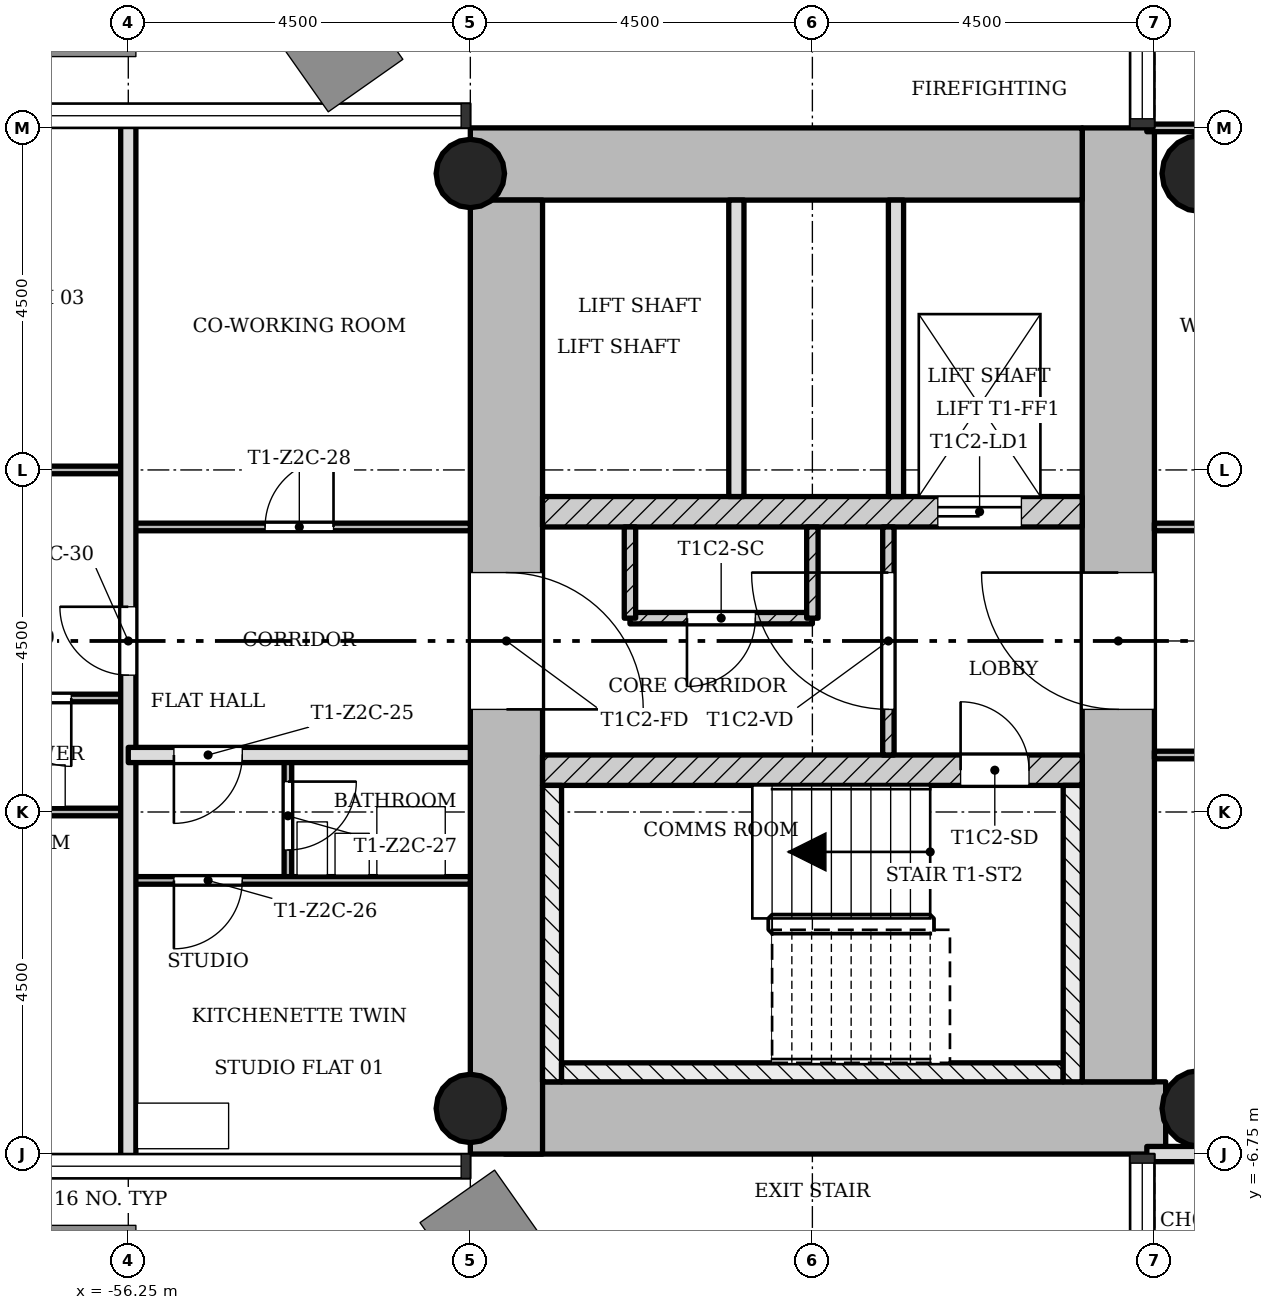
"""IFC4 building model, lengths in metres.
Left out: names, types, materials, properties, quantities, classifications, styles, units other than length and angle.
Written with IfcOpenShell. Run it as: python <this file> out.ifc"""

import sys

from ifc_helpers import new_model, si_unit, direction, frame, frame_2d, origin, origin_2d, place, context, subcontext, project, spatial, rectangle, hollow_circle, extrude, element, fill, save


model = new_model("IFC4")
c1 = context("Model", 3, precision=1e-05, world=origin(), true_north=direction((0.0, 1.0)))
c2 = subcontext(c1, "Body", "Model", "MODEL_VIEW")
j1 = project(units=[si_unit("LENGTHUNIT", "METRE"), si_unit("PLANEANGLEUNIT", "RADIAN")], contexts=[c1])
p1 = place(None, origin())
s1 = spatial("IfcSite", under=j1, at=p1, CompositionType="ELEMENT")
p2 = place(p1, origin())
s2 = spatial("IfcBuilding", under=s1, at=p2, CompositionType="ELEMENT")
p3 = place(p2, frame((0.0, 0.0, 86.8)))
s3 = spatial("IfcBuildingStorey", under=s2, at=p3, CompositionType="ELEMENT", Elevation=86.8)
p4 = place(p3, frame((-51.298, -6.275, 0.0), z_axis=(0.0, 0.0, 1.0), x_axis=(1.0, 0.0, 0.0)))
e1 = element("IfcWall", 1, at=p4, inside=s3, PredefinedType="SHEAR", context=c2, shape_type="SweptSolid", body=[
    extrude(rectangle(XDim=8.696, YDim=0.95, at=frame_2d((4.348, 0.0))), origin(), (0.0, 0.0, 1.0), 3.4),
])
p5 = place(p3, frame((-43.225, -5.8, 0.0), z_axis=(0.0, 0.0, 1.0), x_axis=(0.0, 1.0, 0.0)))
e2 = element("IfcWall", 2, at=p5, inside=s3, PredefinedType="SHEAR", context=c2, shape_type="SweptSolid", body=[
    extrude(rectangle(XDim=12.55, YDim=0.95, at=frame_2d((6.275, 0.0))), origin(), (0.0, 0.0, 1.0), 3.4),
])
p6 = place(p5, frame((4.9, 0.0, 0.0)))
e3 = element("IfcOpeningElement", 3, at=p6, cuts=e2, PredefinedType="OPENING", context=c2, shape_type="SweptSolid", body=[
    extrude(rectangle(XDim=1.8, YDim=2.1, at=frame_2d((0.9, 1.05))), frame((0.0, 0.485, 0.0), z_axis=(0.0, -1.0, 0.0), x_axis=(1.0, 0.0, 0.0)), (0.0, 0.0, 1.0), 0.97),
])
p7 = place(p3, frame((-43.7, 6.275, 0.0), z_axis=(0.0, 0.0, 1.0), x_axis=(-1.0, 0.0, 0.0)))
e4 = element("IfcWall", 4, at=p7, inside=s3, PredefinedType="SHEAR", context=c2, shape_type="SweptSolid", body=[
    extrude(rectangle(XDim=8.05, YDim=0.95, at=frame_2d((4.025, 0.0))), origin(), (0.0, 0.0, 1.0), 3.4),
])
p8 = place(p3, frame((-51.275, 5.8, 0.0), z_axis=(0.0, 0.0, 1.0), x_axis=(0.0, -1.0, 0.0)))
e5 = element("IfcWall", 5, at=p8, inside=s3, PredefinedType="SHEAR", context=c2, shape_type="SweptSolid", body=[
    extrude(rectangle(XDim=12.55, YDim=0.95, at=frame_2d((6.275, 0.0))), origin(), (0.0, 0.0, 1.0), 3.4),
])
p9 = place(p8, frame((4.9, 0.0, 0.0)))
e6 = element("IfcOpeningElement", 6, at=p9, cuts=e5, PredefinedType="OPENING", context=c2, shape_type="SweptSolid", body=[
    extrude(rectangle(XDim=1.8, YDim=2.1, at=frame_2d((0.9, 1.05))), frame((0.0, 0.485, 0.0), z_axis=(0.0, -1.0, 0.0), x_axis=(1.0, 0.0, 0.0)), (0.0, 0.0, 1.0), 0.97),
])
p10 = place(p3, frame((-50.8, -1.7, 0.0), z_axis=(0.0, 0.0, 1.0), x_axis=(1.0, 0.0, 0.0)))
e7 = element("IfcWall", 7, at=p10, inside=s3, PredefinedType="SHEAR", context=c2, shape_type="SweptSolid", body=[
    extrude(rectangle(XDim=7.1, YDim=0.4, at=frame_2d((3.55, 0.0))), origin(), (0.0, 0.0, 1.0), 3.4),
])
p11 = place(p10, frame((5.5, 0.0, 0.0)))
e8 = element("IfcOpeningElement", 8, at=p11, cuts=e7, PredefinedType="OPENING", context=c2, shape_type="SweptSolid", body=[
    extrude(rectangle(XDim=0.9, YDim=2.1, at=frame_2d((0.45, 1.05))), frame((0.0, 0.21, 0.0), z_axis=(0.0, -1.0, 0.0), x_axis=(1.0, 0.0, 0.0)), (0.0, 0.0, 1.0), 0.42),
])
p12 = place(p3, frame((-50.8, 1.7, 0.0), z_axis=(0.0, 0.0, 1.0), x_axis=(1.0, 0.0, 0.0)))
e9 = element("IfcWall", 9, at=p12, inside=s3, PredefinedType="SHEAR", context=c2, shape_type="SweptSolid", body=[
    extrude(rectangle(XDim=7.1, YDim=0.4, at=frame_2d((3.55, 0.0))), origin(), (0.0, 0.0, 1.0), 3.4),
])
p13 = place(p12, frame((5.2, 0.0, 0.0)))
e10 = element("IfcOpeningElement", 10, at=p13, cuts=e9, PredefinedType="OPENING", context=c2, shape_type="SweptSolid", body=[
    extrude(rectangle(XDim=1.1, YDim=2.1, at=frame_2d((0.55, 1.05))), frame((0.0, 0.21, 0.0), z_axis=(0.0, -1.0, 0.0), x_axis=(1.0, 0.0, 0.0)), (0.0, 0.0, 1.0), 0.42),
])
for number, where, z_axis, x_axis in (
    (11, (-51.75, -6.15, 0.0), (0.0, 0.0, 1.0), (1.0, 0.0, 0.0)),
    (12, (-51.75, 6.15, 0.0), (0.0, 0.0, 1.0), (1.0, 0.0, 0.0)),
):
    element("IfcColumn", number, at=place(p3, frame(where, z_axis=z_axis, x_axis=x_axis)), inside=s3, PredefinedType="COLUMN", context=c2, shape_type="SweptSolid", body=[
        extrude(hollow_circle(Radius=0.45, WallThickness=0.032, at=origin_2d()), origin(), (0.0, 0.0, 1.0), 3.4),
    ])
for number, where, z_axis, x_axis in (
    (13, (-42.15, -6.15, 0.0), (0.0, 0.0, 1.0), (1.0, 0.0, 0.0)),
    (14, (-42.15, 6.15, 0.0), (0.0, 0.0, 1.0), (1.0, 0.0, 0.0)),
):
    element("IfcColumn", number, at=place(p3, frame(where, z_axis=z_axis, x_axis=x_axis)), inside=s3, PredefinedType="COLUMN", context=c2, shape_type="SweptSolid", body=[
        extrude(hollow_circle(Radius=0.5, WallThickness=0.036, at=origin_2d()), origin(), (0.0, 0.0, 1.0), 3.4),
    ])
p14 = place(p3, frame((-46.25, 1.5, 0.0), z_axis=(0.0, 0.0, 1.0), x_axis=(0.0, -1.0, 0.0)))
e15 = element("IfcWall", 15, at=p14, inside=s3, PredefinedType="PARTITIONING", context=c2, shape_type="SweptSolid", body=[
    extrude(rectangle(XDim=3.0, YDim=0.15, at=frame_2d((1.5, 0.0))), origin(), (0.0, 0.0, 1.0), 3.0),
])
p15 = place(p14, frame((0.6, 0.0, 0.0)))
e16 = element("IfcOpeningElement", 16, at=p15, cuts=e15, PredefinedType="OPENING", context=c2, shape_type="SweptSolid", body=[
    extrude(rectangle(XDim=1.8, YDim=2.1, at=frame_2d((0.9, 1.05))), frame((0.0, 0.085, 0.0), z_axis=(0.0, -1.0, 0.0), x_axis=(1.0, 0.0, 0.0)), (0.0, 0.0, 1.0), 0.17),
])
for number, where, z_axis, x_axis in (
    (17, (-46.15, 5.8, 0.0), (0.0, 0.0, 1.0), (0.0, -1.0, 0.0)),
    (18, (-48.25, 5.8, 0.0), (0.0, 0.0, 1.0), (0.0, -1.0, 0.0)),
):
    element("IfcWall", number, at=place(p3, frame(where, z_axis=z_axis, x_axis=x_axis)), inside=s3, PredefinedType="SOLIDWALL", context=c2, shape_type="SweptSolid", body=[
        extrude(rectangle(XDim=3.9, YDim=0.2, at=frame_2d((1.95, 0.0))), origin(), (0.0, 0.0, 1.0), 3.0),
    ])
p16 = place(p3, frame((-47.25, 0.3, 0.0), z_axis=(0.0, 0.0, 1.0), x_axis=(-1.0, 0.0, 0.0)))
e19 = element("IfcWall", 19, at=p16, inside=s3, PredefinedType="PARTITIONING", context=c2, shape_type="SweptSolid", body=[
    extrude(rectangle(XDim=2.4, YDim=0.15, at=frame_2d((1.2, 0.0))), origin(), (0.0, 0.0, 1.0), 3.0),
])
p17 = place(p16, frame((0.75, 0.0, 0.0)))
e20 = element("IfcOpeningElement", 20, at=p17, cuts=e19, PredefinedType="OPENING", context=c2, shape_type="SweptSolid", body=[
    extrude(rectangle(XDim=0.9, YDim=2.1, at=frame_2d((0.45, 1.05))), frame((0.0, 0.085, 0.0), z_axis=(0.0, -1.0, 0.0), x_axis=(1.0, 0.0, 0.0)), (0.0, 0.0, 1.0), 0.17),
])
for number, where, z_axis, x_axis in (
    (21, (-47.25, 0.3, 0.0), (0.0, 0.0, 1.0), (0.0, 1.0, 0.0)),
    (22, (-49.65, 0.3, 0.0), (0.0, 0.0, 1.0), (0.0, 1.0, 0.0)),
):
    element("IfcWall", number, at=place(p3, frame(where, z_axis=z_axis, x_axis=x_axis)), inside=s3, PredefinedType="PARTITIONING", context=c2, shape_type="SweptSolid", body=[
        extrude(rectangle(XDim=1.2, YDim=0.15, at=frame_2d((0.6, 0.0))), origin(), (0.0, 0.0, 1.0), 3.0),
    ])
p18 = place(p3, frame((-56.25, -6.85, 0.0), z_axis=(0.0, 0.0, 1.0), x_axis=(0.0, 1.0, 0.0)))
e23 = element("IfcWall", 23, at=p18, inside=s3, PredefinedType="SOLIDWALL", context=c2, shape_type="SweptSolid", body=[
    extrude(rectangle(XDim=13.7, YDim=0.2, at=frame_2d((6.85, 0.0))), origin(), (0.0, 0.0, 1.0), 3.0),
])
p19 = place(p18, frame((6.4, 0.0, 0.0)))
e24 = element("IfcOpeningElement", 24, at=p19, cuts=e23, PredefinedType="OPENING", context=c2, shape_type="SweptSolid", body=[
    extrude(rectangle(XDim=0.9, YDim=2.1, at=frame_2d((0.45, 1.05))), frame((0.0, 0.11, 0.0), z_axis=(0.0, -1.0, 0.0), x_axis=(1.0, 0.0, 0.0)), (0.0, 0.0, 1.0), 0.22),
])
p20 = place(p3, frame((-54.15, -3.15, 0.0), z_axis=(0.0, 0.0, 1.0), x_axis=(0.0, 1.0, 0.0)))
e25 = element("IfcWall", 25, at=p20, inside=s3, PredefinedType="PARTITIONING", context=c2, shape_type="SweptSolid", body=[
    extrude(rectangle(XDim=1.65, YDim=0.1, at=frame_2d((0.825, 0.0))), origin(), (0.0, 0.0, 1.0), 3.0),
])
p21 = place(p20, frame((0.4, 0.0, 0.0)))
e26 = element("IfcOpeningElement", 26, at=p21, cuts=e25, PredefinedType="OPENING", context=c2, shape_type="SweptSolid", body=[
    extrude(rectangle(XDim=0.9, YDim=2.1, at=frame_2d((0.45, 1.05))), frame((0.0, 0.06, 0.0), z_axis=(0.0, -1.0, 0.0), x_axis=(1.0, 0.0, 0.0)), (0.0, 0.0, 1.0), 0.12),
])
p22 = place(p3, frame((-42.85, -6.75, 0.0), z_axis=(0.0, 0.0, 1.0), x_axis=(1.0, 0.0, 0.0)))
e27 = element("IfcWall", 27, at=p22, inside=s3, PredefinedType="SOLIDWALL", context=c2, shape_type="SweptSolid", body=[
    extrude(rectangle(XDim=13.7, YDim=0.2, at=frame_2d((6.85, 0.0))), origin(), (0.0, 0.0, 1.0), 3.0),
])
p23 = place(p22, frame((6.4, 0.0, 0.0)))
e28 = element("IfcOpeningElement", 28, at=p23, cuts=e27, PredefinedType="OPENING", context=c2, shape_type="SweptSolid", body=[
    extrude(rectangle(XDim=0.9, YDim=2.1, at=frame_2d((0.45, 1.05))), frame((0.0, 0.11, 0.0), z_axis=(0.0, -1.0, 0.0), x_axis=(1.0, 0.0, 0.0)), (0.0, 0.0, 1.0), 0.22),
])
p24 = place(p3, frame((-56.25, -3.15, 0.0), z_axis=(0.0, 0.0, 1.0), x_axis=(1.0, 0.0, 0.0)))
e29 = element("IfcWall", 29, at=p24, inside=s3, PredefinedType="PARTITIONING", context=c2, shape_type="SweptSolid", body=[
    extrude(rectangle(XDim=4.5, YDim=0.1, at=frame_2d((2.25, 0.0))), origin(), (0.0, 0.0, 1.0), 3.0),
])
p25 = place(p24, frame((0.6, 0.0, 0.0)))
e30 = element("IfcOpeningElement", 30, at=p25, cuts=e29, PredefinedType="OPENING", context=c2, shape_type="SweptSolid", body=[
    extrude(rectangle(XDim=0.9, YDim=2.1, at=frame_2d((0.45, 1.05))), frame((0.0, 0.06, 0.0), z_axis=(0.0, -1.0, 0.0), x_axis=(1.0, 0.0, 0.0)), (0.0, 0.0, 1.0), 0.12),
])
p26 = place(p3, frame((-60.85, -2.25, 0.0), z_axis=(0.0, 0.0, 1.0), x_axis=(1.0, 0.0, 0.0)))
e31 = element("IfcWall", 31, at=p26, inside=s3, PredefinedType="PARTITIONING", context=c2, shape_type="SweptSolid", body=[
    extrude(rectangle(XDim=4.6, YDim=0.1, at=frame_2d((2.3, 0.0))), origin(), (0.0, 0.0, 1.0), 3.0),
])
p27 = place(p26, frame((1.25, 0.0, 0.0)))
e32 = element("IfcOpeningElement", 32, at=p27, cuts=e31, PredefinedType="OPENING", context=c2, shape_type="SweptSolid", body=[
    extrude(rectangle(XDim=0.9, YDim=2.1, at=frame_2d((0.45, 1.05))), frame((0.0, 0.06, 0.0), z_axis=(0.0, -1.0, 0.0), x_axis=(1.0, 0.0, 0.0)), (0.0, 0.0, 1.0), 0.12),
])
p28 = place(p3, frame((-42.75, -1.5, 0.0), z_axis=(0.0, 0.0, 1.0), x_axis=(1.0, 0.0, 0.0)))
e33 = element("IfcWall", 33, at=p28, inside=s3, PredefinedType="PARTITIONING", context=c2, shape_type="SweptSolid", body=[
    extrude(rectangle(XDim=5.85, YDim=0.1, at=frame_2d((2.925, 0.0))), origin(), (0.0, 0.0, 1.0), 3.0),
])
p29 = place(p28, frame((2.475, 0.0, 0.0)))
e34 = element("IfcOpeningElement", 34, at=p29, cuts=e33, PredefinedType="OPENING", context=c2, shape_type="SweptSolid", body=[
    extrude(rectangle(XDim=0.9, YDim=2.1, at=frame_2d((0.45, 1.05))), frame((0.0, 0.06, 0.0), z_axis=(0.0, -1.0, 0.0), x_axis=(1.0, 0.0, 0.0)), (0.0, 0.0, 1.0), 0.12),
])
p30 = place(p3, frame((-56.25, -1.5, 0.0), z_axis=(0.0, 0.0, 1.0), x_axis=(1.0, 0.0, 0.0)))
e35 = element("IfcWall", 35, at=p30, inside=s3, PredefinedType="SOLIDWALL", context=c2, shape_type="SweptSolid", body=[
    extrude(rectangle(XDim=4.5, YDim=0.2, at=frame_2d((2.25, 0.0))), origin(), (0.0, 0.0, 1.0), 3.0),
])
p31 = place(p30, frame((0.6, 0.0, 0.0)))
e36 = element("IfcOpeningElement", 36, at=p31, cuts=e35, PredefinedType="OPENING", context=c2, shape_type="SweptSolid", body=[
    extrude(rectangle(XDim=0.9, YDim=2.1, at=frame_2d((0.45, 1.05))), frame((0.0, 0.11, 0.0), z_axis=(0.0, -1.0, 0.0), x_axis=(1.0, 0.0, 0.0)), (0.0, 0.0, 1.0), 0.22),
])
p32 = place(p3, frame((-58.65, -0.75, 0.0), z_axis=(0.0, 0.0, 1.0), x_axis=(1.0, 0.0, 0.0)))
e37 = element("IfcWall", 37, at=p32, inside=s3, PredefinedType="PARTITIONING", context=c2, shape_type="SweptSolid", body=[
    extrude(rectangle(XDim=2.4, YDim=0.1, at=frame_2d((1.2, 0.0))), origin(), (0.0, 0.0, 1.0), 3.0),
])
p33 = place(p32, frame((0.75, 0.0, 0.0)))
e38 = element("IfcOpeningElement", 38, at=p33, cuts=e37, PredefinedType="OPENING", context=c2, shape_type="SweptSolid", body=[
    extrude(rectangle(XDim=0.9, YDim=2.1, at=frame_2d((0.45, 1.05))), frame((0.0, 0.06, 0.0), z_axis=(0.0, -1.0, 0.0), x_axis=(1.0, 0.0, 0.0)), (0.0, 0.0, 1.0), 0.12),
])
p34 = place(p3, frame((-56.25, 1.5, 0.0), z_axis=(0.0, 0.0, 1.0), x_axis=(1.0, 0.0, 0.0)))
e39 = element("IfcWall", 39, at=p34, inside=s3, PredefinedType="PARTITIONING", context=c2, shape_type="SweptSolid", body=[
    extrude(rectangle(XDim=4.5, YDim=0.1, at=frame_2d((2.25, 0.0))), origin(), (0.0, 0.0, 1.0), 3.0),
])
p35 = place(p34, frame((1.8, 0.0, 0.0)))
e40 = element("IfcOpeningElement", 40, at=p35, cuts=e39, PredefinedType="OPENING", context=c2, shape_type="SweptSolid", body=[
    extrude(rectangle(XDim=0.9, YDim=2.1, at=frame_2d((0.45, 1.05))), frame((0.0, 0.06, 0.0), z_axis=(0.0, -1.0, 0.0), x_axis=(1.0, 0.0, 0.0)), (0.0, 0.0, 1.0), 0.12),
])
p36 = place(p3, frame((-42.75, 1.5, 0.0), z_axis=(0.0, 0.0, 1.0), x_axis=(1.0, 0.0, 0.0)))
e41 = element("IfcWall", 41, at=p36, inside=s3, PredefinedType="PARTITIONING", context=c2, shape_type="SweptSolid", body=[
    extrude(rectangle(XDim=5.85, YDim=0.1, at=frame_2d((2.925, 0.0))), origin(), (0.0, 0.0, 1.0), 3.0),
])
p37 = place(p36, frame((1.125, 0.0, 0.0)))
e42 = element("IfcOpeningElement", 42, at=p37, cuts=e41, PredefinedType="OPENING", context=c2, shape_type="SweptSolid", body=[
    extrude(rectangle(XDim=0.9, YDim=2.1, at=frame_2d((0.45, 1.05))), frame((0.0, 0.06, 0.0), z_axis=(0.0, -1.0, 0.0), x_axis=(1.0, 0.0, 0.0)), (0.0, 0.0, 1.0), 0.12),
])
p38 = place(p3, frame((-60.85, 2.25, 0.0), z_axis=(0.0, 0.0, 1.0), x_axis=(1.0, 0.0, 0.0)))
e43 = element("IfcWall", 43, at=p38, inside=s3, PredefinedType="PARTITIONING", context=c2, shape_type="SweptSolid", body=[
    extrude(rectangle(XDim=4.6, YDim=0.1, at=frame_2d((2.3, 0.0))), origin(), (0.0, 0.0, 1.0), 3.0),
])
p39 = place(p38, frame((1.9, 0.0, 0.0)))
e44 = element("IfcOpeningElement", 44, at=p39, cuts=e43, PredefinedType="OPENING", context=c2, shape_type="SweptSolid", body=[
    extrude(rectangle(XDim=0.9, YDim=2.1, at=frame_2d((0.45, 1.05))), frame((0.0, 0.06, 0.0), z_axis=(0.0, -1.0, 0.0), x_axis=(1.0, 0.0, 0.0)), (0.0, 0.0, 1.0), 0.12),
])
p40 = place(p3, frame((-42.85, 6.75, 0.0), z_axis=(0.0, 0.0, 1.0), x_axis=(1.0, 0.0, 0.0)))
e45 = element("IfcWall", 45, at=p40, inside=s3, PredefinedType="PARTITIONING", context=c2, shape_type="SweptSolid", body=[
    extrude(rectangle(XDim=5.95, YDim=0.1, at=frame_2d((2.975, 0.0))), origin(), (0.0, 0.0, 1.0), 3.0),
])
p41 = place(p3, frame((-50.675, -1.9, 0.0), z_axis=(0.0, 0.0, 1.0), x_axis=(0.0, -1.0, 0.0)))
e46 = element("IfcWall", 46, at=p41, inside=s3, PredefinedType="SHEAR", context=c2, shape_type="SweptSolid", body=[
    extrude(rectangle(XDim=3.9, YDim=0.25, at=frame_2d((1.95, 0.0))), origin(), (0.0, 0.0, 1.0), 3.4),
])
p42 = place(p3, frame((-43.95, -5.675, 0.0), z_axis=(0.0, 0.0, 1.0), x_axis=(-1.0, 0.0, 0.0)))
e47 = element("IfcWall", 47, at=p42, inside=s3, PredefinedType="SHEAR", context=c2, shape_type="SweptSolid", body=[
    extrude(rectangle(XDim=6.6, YDim=0.25, at=frame_2d((3.3, 0.0))), origin(), (0.0, 0.0, 1.0), 3.4),
])
p43 = place(p3, frame((-43.825, -1.9, 0.0), z_axis=(0.0, 0.0, 1.0), x_axis=(0.0, -1.0, 0.0)))
e48 = element("IfcWall", 48, at=p43, inside=s3, PredefinedType="SHEAR", context=c2, shape_type="SweptSolid", body=[
    extrude(rectangle(XDim=3.9, YDim=0.25, at=frame_2d((1.95, 0.0))), origin(), (0.0, 0.0, 1.0), 3.4),
])
p44 = place(p15, origin())
e49 = element("IfcDoor", 49, at=p44, inside=s3, OperationType="SINGLE_SWING_LEFT", PredefinedType="DOOR", context=c2, shape_type="SweptSolid", body=[
    extrude(rectangle(XDim=1.8, YDim=2.1, at=frame_2d((0.9, 1.05))), frame((0.0, 0.025, 0.0), z_axis=(0.0, -1.0, 0.0), x_axis=(1.0, 0.0, 0.0)), (0.0, 0.0, 1.0), 0.05),
])
fill(e16, e49)
p45 = place(p17, origin())
e50 = element("IfcDoor", 50, at=p45, inside=s3, OperationType="SINGLE_SWING_LEFT", PredefinedType="DOOR", context=c2, shape_type="SweptSolid", body=[
    extrude(rectangle(XDim=0.9, YDim=2.1, at=frame_2d((0.45, 1.05))), frame((0.0, 0.025, 0.0), z_axis=(0.0, -1.0, 0.0), x_axis=(1.0, 0.0, 0.0)), (0.0, 0.0, 1.0), 0.05),
])
fill(e20, e50)
p46 = place(p31, origin())
e51 = element("IfcDoor", 51, at=p46, inside=s3, OperationType="SINGLE_SWING_LEFT", PredefinedType="DOOR", context=c2, shape_type="SweptSolid", body=[
    extrude(rectangle(XDim=0.9, YDim=2.1, at=frame_2d((0.45, 1.05))), frame((0.0, 0.025, 0.0), z_axis=(0.0, -1.0, 0.0), x_axis=(1.0, 0.0, 0.0)), (0.0, 0.0, 1.0), 0.05),
])
fill(e36, e51)
p47 = place(p25, origin())
e52 = element("IfcDoor", 52, at=p47, inside=s3, OperationType="SINGLE_SWING_LEFT", PredefinedType="DOOR", context=c2, shape_type="SweptSolid", body=[
    extrude(rectangle(XDim=0.9, YDim=2.1, at=frame_2d((0.45, 1.05))), frame((0.0, 0.025, 0.0), z_axis=(0.0, -1.0, 0.0), x_axis=(1.0, 0.0, 0.0)), (0.0, 0.0, 1.0), 0.05),
])
fill(e30, e52)
p48 = place(p21, origin())
e53 = element("IfcDoor", 53, at=p48, inside=s3, OperationType="SINGLE_SWING_RIGHT", PredefinedType="DOOR", context=c2, shape_type="SweptSolid", body=[
    extrude(rectangle(XDim=0.9, YDim=2.1, at=frame_2d((0.45, 1.05))), frame((0.0, 0.025, 0.0), z_axis=(0.0, -1.0, 0.0), x_axis=(1.0, 0.0, 0.0)), (0.0, 0.0, 1.0), 0.05),
])
fill(e26, e53)
p49 = place(p35, origin())
e54 = element("IfcDoor", 54, at=p49, inside=s3, OperationType="SINGLE_SWING_LEFT", PredefinedType="DOOR", context=c2, shape_type="SweptSolid", body=[
    extrude(rectangle(XDim=0.9, YDim=2.1, at=frame_2d((0.45, 1.05))), frame((0.0, 0.025, 0.0), z_axis=(0.0, -1.0, 0.0), x_axis=(1.0, 0.0, 0.0)), (0.0, 0.0, 1.0), 0.05),
])
fill(e40, e54)
p50 = place(p33, origin())
e55 = element("IfcDoor", 55, at=p50, inside=s3, OperationType="SINGLE_SWING_RIGHT", PredefinedType="DOOR", context=c2, shape_type="SweptSolid", body=[
    extrude(rectangle(XDim=0.9, YDim=2.1, at=frame_2d((0.45, 1.05))), frame((0.0, 0.025, 0.0), z_axis=(0.0, -1.0, 0.0), x_axis=(1.0, 0.0, 0.0)), (0.0, 0.0, 1.0), 0.05),
])
fill(e38, e55)
p51 = place(p19, origin())
e56 = element("IfcDoor", 56, at=p51, inside=s3, OperationType="SINGLE_SWING_LEFT", PredefinedType="DOOR", context=c2, shape_type="SweptSolid", body=[
    extrude(rectangle(XDim=0.9, YDim=2.1, at=frame_2d((0.45, 1.05))), frame((0.0, 0.025, 0.0), z_axis=(0.0, -1.0, 0.0), x_axis=(1.0, 0.0, 0.0)), (0.0, 0.0, 1.0), 0.05),
])
fill(e24, e56)
p52 = place(p11, origin())
e57 = element("IfcDoor", 57, at=p52, inside=s3, OperationType="SINGLE_SWING_RIGHT", PredefinedType="DOOR", context=c2, shape_type="SweptSolid", body=[
    extrude(rectangle(XDim=0.9, YDim=2.1, at=frame_2d((0.45, 1.05))), frame((0.0, 0.025, 0.0), z_axis=(0.0, -1.0, 0.0), x_axis=(1.0, 0.0, 0.0)), (0.0, 0.0, 1.0), 0.05),
])
fill(e8, e57)
p53 = place(p13, origin())
e58 = element("IfcDoor", 58, at=p53, inside=s3, OperationType="SLIDING_TO_LEFT", PredefinedType="DOOR", context=c2, shape_type="SweptSolid", body=[
    extrude(rectangle(XDim=1.1, YDim=2.1, at=frame_2d((0.55, 1.05))), frame((0.0, 0.025, 0.0), z_axis=(0.0, -1.0, 0.0), x_axis=(1.0, 0.0, 0.0)), (0.0, 0.0, 1.0), 0.05),
])
fill(e10, e58)
p54 = place(p6, origin())
e59 = element("IfcDoor", 59, at=p54, inside=s3, OperationType="SINGLE_SWING_LEFT", PredefinedType="DOOR", context=c2, shape_type="SweptSolid", body=[
    extrude(rectangle(XDim=1.8, YDim=2.1, at=frame_2d((0.9, 1.05))), frame((0.0, 0.025, 0.0), z_axis=(0.0, -1.0, 0.0), x_axis=(1.0, 0.0, 0.0)), (0.0, 0.0, 1.0), 0.05),
])
fill(e3, e59)
p55 = place(p9, origin())
e60 = element("IfcDoor", 60, at=p55, inside=s3, OperationType="SINGLE_SWING_LEFT", PredefinedType="DOOR", context=c2, shape_type="SweptSolid", body=[
    extrude(rectangle(XDim=1.8, YDim=2.1, at=frame_2d((0.9, 1.05))), frame((0.0, 0.025, 0.0), z_axis=(0.0, -1.0, 0.0), x_axis=(1.0, 0.0, 0.0)), (0.0, 0.0, 1.0), 0.05),
])
fill(e6, e60)
save(model, sys.argv[1])
